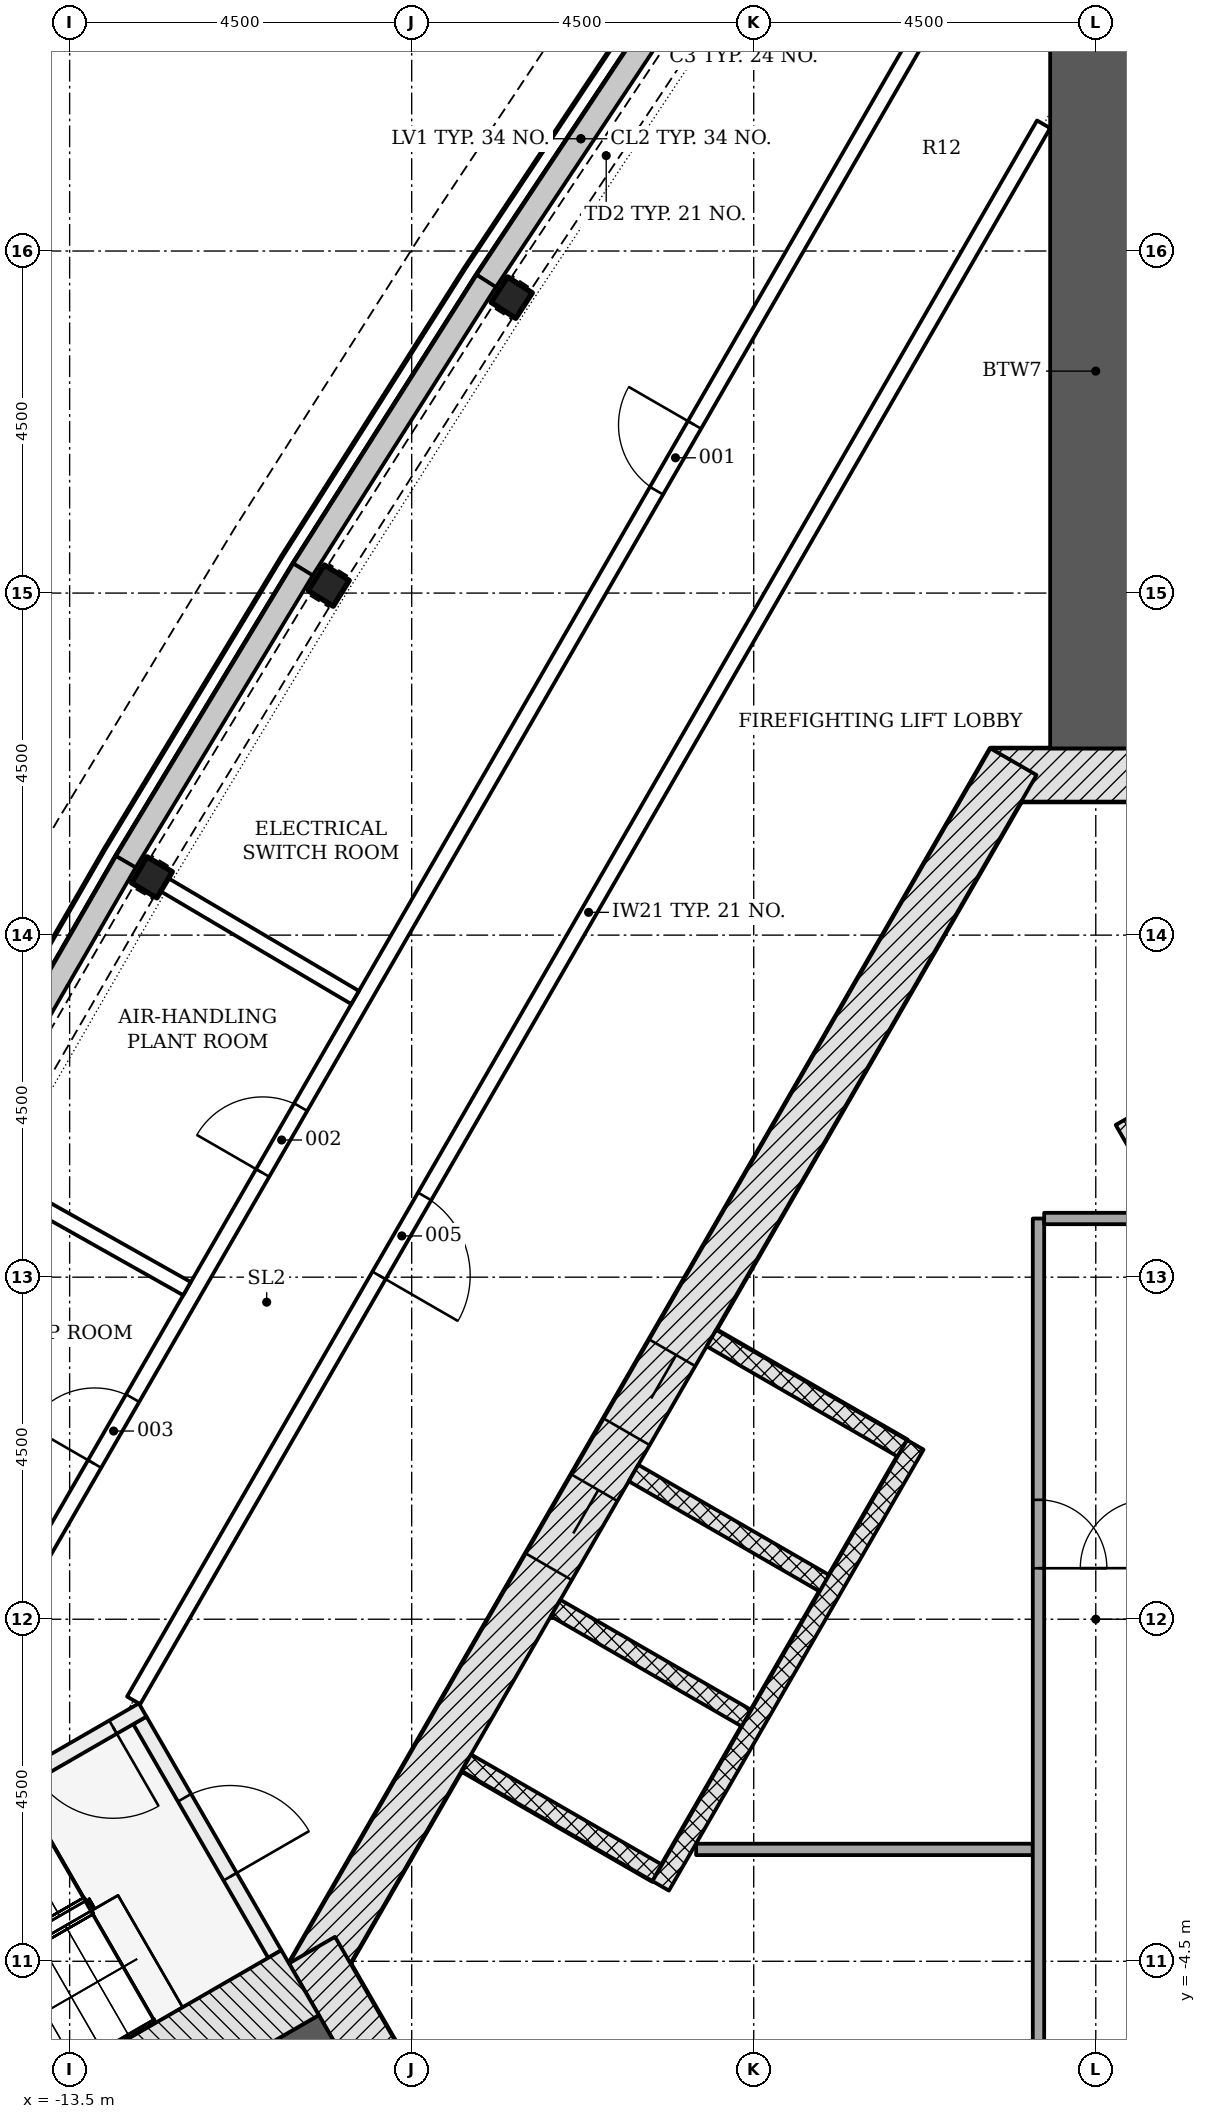
"""IFC4 building model, lengths in metres.
Left out: names, types, materials, properties, quantities, classifications, styles, units other than length and angle.
Written with IfcOpenShell. Run it as: python <this file> out.ifc"""

import sys

from ifc_helpers import new_model, si_unit, direction, frame, frame_2d, origin, origin_2d, place, context, subcontext, project, spatial, polyline, rectangle, i_section, outline, extrude, element, fill, save


model = new_model("IFC4")
c1 = context("Model", 3, precision=1e-05, world=origin(), true_north=direction((0.0, 1.0)))
c2 = subcontext(c1, "Body", "Model", "MODEL_VIEW")
j1 = project(units=[si_unit("LENGTHUNIT", "METRE"), si_unit("PLANEANGLEUNIT", "RADIAN")], contexts=[c1])
p1 = place(None, origin())
s1 = spatial("IfcSite", under=j1, at=p1, CompositionType="ELEMENT")
p2 = place(p1, origin())
s2 = spatial("IfcBuilding", under=s1, at=p2, CompositionType="ELEMENT")
p3 = place(p2, frame((0.0, 0.0, 168.9)))
s3 = spatial("IfcBuildingStorey", under=s2, at=p3, CompositionType="ELEMENT", Elevation=168.9)
p4 = place(p3, frame((1.386, 11.106, -0.3), z_axis=(0.0, 0.0, 1.0), x_axis=(-1.0, 0.0, 0.0)))
e1 = element("IfcWall", 1, at=p4, inside=s3, PredefinedType="SHEAR", context=c2, shape_type="SweptSolid", body=[
    extrude(rectangle(XDim=2.771, YDim=0.7, at=frame_2d((1.386, 0.0))), origin(), (0.0, 0.0, 1.0), 5.5),
])
p5 = place(p3, frame((-1.083, 11.281, -0.3), z_axis=(0.0, 0.0, 1.0), x_axis=(-0.500001446645, -0.866024568562, 0.0)))
e2 = element("IfcWall", 2, at=p5, inside=s3, PredefinedType="SHEAR", context=c2, shape_type="SweptSolid", body=[
    extrude(rectangle(XDim=18.458, YDim=0.7, at=frame_2d((9.229, 0.0))), origin(), (0.0, 0.0, 1.0), 5.5),
])
p6 = place(p5, frame((8.979, 0.0, 0.3)))
e3 = element("IfcOpeningElement", 3, at=p6, cuts=e2, PredefinedType="OPENING", context=c2, shape_type="SweptSolid", body=[
    extrude(rectangle(XDim=1.2, YDim=2.1, at=frame_2d((0.6, 1.05))), frame((0.0, 0.36, 0.0), z_axis=(0.0, -1.0, 0.0), x_axis=(1.0, 0.0, 0.0)), (0.0, 0.0, 1.0), 0.72),
])
p7 = place(p5, frame((11.029, 0.0, 0.3)))
e4 = element("IfcOpeningElement", 4, at=p7, cuts=e2, PredefinedType="OPENING", context=c2, shape_type="SweptSolid", body=[
    extrude(rectangle(XDim=1.2, YDim=2.1, at=frame_2d((0.6, 1.05))), frame((0.0, 0.36, 0.0), z_axis=(0.0, -1.0, 0.0), x_axis=(1.0, 0.0, 0.0)), (0.0, 0.0, 1.0), 0.72),
])
p8 = place(p3, frame((-10.311, -4.353, -0.3), z_axis=(0.0, 0.0, 1.0), x_axis=(0.500042739161, -0.866000726912, 0.0)))
e5 = element("IfcWall", 5, at=p8, inside=s3, PredefinedType="SHEAR", context=c2, shape_type="SweptSolid", body=[
    extrude(rectangle(XDim=2.771, YDim=0.7, at=frame_2d((1.386, 0.0))), origin(), (0.0, 0.0, 1.0), 5.5),
])
p9 = place(p3, frame((0.0, 11.456, -0.3), z_axis=(0.0, 0.0, 1.0), x_axis=(0.0, 1.0, 0.0)))
e6 = element("IfcWall", 6, at=p9, inside=s3, PredefinedType="SHEAR", context=c2, shape_type="SweptSolid", body=[
    extrude(rectangle(XDim=9.928, YDim=1.2, at=frame_2d((4.964, 0.0))), origin(), (0.0, 0.0, 1.0), 5.5),
])
p10 = place(p3, frame((-9.922, -5.728, -0.3), z_axis=(0.0, 0.0, 1.0), x_axis=(-0.866029553954, -0.499992811627, 0.0)))
e7 = element("IfcWall", 7, at=p10, inside=s3, PredefinedType="SHEAR", context=c2, shape_type="SweptSolid", body=[
    extrude(rectangle(XDim=9.927, YDim=1.2, at=frame_2d((4.964, 0.0))), origin(), (0.0, 0.0, 1.0), 5.5),
])
for number, where, z_axis, x_axis in (
    (8, (-7.684, 17.387, -0.3), (0.0, 0.0, 1.0), (-0.545, -0.838, 0.0)),
    (9, (-10.091, 13.599, -0.3), (0.0, 0.0, 1.0), (-0.527, -0.85, 0.0)),
    (10, (-12.417, 9.76, -0.3), (0.0, 0.0, 1.0), (-0.509, -0.861, 0.0)),
):
    element("IfcColumn", number, at=place(p3, frame(where, z_axis=z_axis, x_axis=x_axis)), inside=s3, PredefinedType="COLUMN", context=c2, shape_type="SweptSolid", body=[
        extrude(i_section(OverallWidth=0.399, OverallDepth=0.386, WebThickness=0.021, FlangeThickness=0.033, FilletRadius=0.015, at=origin_2d()), origin(), (0.0, 0.0, 1.0), 5.5),
    ])
p11 = place(p3, origin())
e11 = element("IfcWall", 11, at=p11, inside=s3, PredefinedType="NOTDEFINED", context=c2, shape_type="SweptSolid", body=[
    extrude(outline(polyline([(-5.652, 21.433), (-8.145, 17.687), (-7.896, 17.521), (-5.403, 21.267), (-5.652, 21.433)])), origin(), (0.0, 0.0, 1.0), 1.2),
])
p12 = place(p3, origin())
e12 = element("IfcWall", 12, at=p12, inside=s3, PredefinedType="NOTDEFINED", context=c2, shape_type="SweptSolid", body=[
    extrude(outline(polyline([(-8.145, 17.687), (-10.558, 13.889), (-10.305, 13.728), (-7.892, 17.526), (-8.145, 17.687)])), origin(), (0.0, 0.0, 1.0), 1.2),
])
p13 = place(p3, origin())
e13 = element("IfcWall", 13, at=p13, inside=s3, PredefinedType="NOTDEFINED", context=c2, shape_type="SweptSolid", body=[
    extrude(outline(polyline([(-10.558, 13.889), (-12.89, 10.04), (-12.634, 9.885), (-10.302, 13.733), (-10.558, 13.889)])), origin(), (0.0, 0.0, 1.0), 1.2),
])
p14 = place(p3, origin())
e14 = element("IfcWall", 14, at=p14, inside=s3, PredefinedType="NOTDEFINED", context=c2, shape_type="SweptSolid", body=[
    extrude(outline(polyline([(-12.89, 10.04), (-15.14, 6.143), (-14.88, 5.993), (-12.63, 9.89), (-12.89, 10.04)])), origin(), (0.0, 0.0, 1.0), 1.2),
])
p15 = place(p3, frame((5.87, -2.961, 0.0), z_axis=(0.0, 0.0, 1.0), x_axis=(-0.50000615651, 0.866021849293, 0.0)))
e15 = element("IfcWall", 15, at=p15, inside=s3, PredefinedType="PARTITIONING", context=c2, shape_type="SweptSolid", body=[
    extrude(rectangle(XDim=11.0, YDim=0.25, at=frame_2d((5.5, 0.0))), origin(), (0.0, 0.0, 1.0), 5.2),
])
for number, where, z_axis, x_axis in (
    (16, (-5.056, 3.699, -0.3), (0.0, 0.0, 1.0), (0.866, -0.5, 0.0)),
    (17, (-6.081, 1.923, -0.3), (0.0, 0.0, 1.0), (0.866, -0.5, 0.0)),
    (18, (-7.106, 0.148, -0.3), (0.0, 0.0, 1.0), (0.866, -0.5, 0.0)),
    (19, (-8.281, -1.887, -0.3), (0.0, 0.0, 1.0), (0.866, -0.5, 0.0)),
):
    element("IfcWall", number, at=place(p3, frame(where, z_axis=z_axis, x_axis=x_axis)), inside=s3, PredefinedType="PARTITIONING", context=c2, shape_type="SweptSolid", body=[
        extrude(rectangle(XDim=2.9, YDim=0.25, at=frame_2d((1.45, 0.0))), origin(), (0.0, 0.0, 1.0), 5.5),
    ])
p16 = place(p3, frame((-2.374, 2.294, 0.0), z_axis=(0.0, 0.0, 1.0), x_axis=(-0.500003174267, -0.866023571113, 0.0)))
e20 = element("IfcWall", 20, at=p16, inside=s3, PredefinedType="PARTITIONING", context=c2, shape_type="SweptSolid", body=[
    extrude(rectangle(XDim=6.7, YDim=0.25, at=frame_2d((3.35, 0.0))), origin(), (0.0, 0.0, 1.0), 5.2),
])
p17 = place(p3, frame((-5.258, -3.028, 0.0), z_axis=(0.0, 0.0, 1.0), x_axis=(1.0, 0.0, 0.0)))
e21 = element("IfcWall", 21, at=p17, inside=s3, PredefinedType="PARTITIONING", context=c2, shape_type="SweptSolid", body=[
    extrude(rectangle(XDim=4.429, YDim=0.15, at=frame_2d((2.215, 0.0))), origin(), (0.0, 0.0, 1.0), 5.2),
])
p18 = place(p3, frame((-0.754, 5.272, 0.0), z_axis=(0.0, 0.0, 1.0), x_axis=(0.0, -1.0, 0.0)))
e22 = element("IfcWall", 22, at=p18, inside=s3, PredefinedType="PARTITIONING", context=c2, shape_type="SweptSolid", body=[
    extrude(rectangle(XDim=11.5, YDim=0.15, at=frame_2d((5.75, 0.0))), origin(), (0.0, 0.0, 1.0), 5.2),
])
p19 = place(p18, frame((3.701, 0.0, 0.0)))
e23 = element("IfcOpeningElement", 23, at=p19, cuts=e22, PredefinedType="OPENING", context=c2, shape_type="SweptSolid", body=[
    extrude(rectangle(XDim=0.9, YDim=2.1, at=frame_2d((0.45, 1.05))), frame((0.0, 0.085, 0.0), z_axis=(0.0, -1.0, 0.0), x_axis=(1.0, 0.0, 0.0)), (0.0, 0.0, 1.0), 0.17),
])
p20 = place(p3, frame((-0.679, 5.272, 0.0), z_axis=(0.0, 0.0, 1.0), x_axis=(1.0, 0.0, 0.0)))
e24 = element("IfcWall", 24, at=p20, inside=s3, PredefinedType="PARTITIONING", context=c2, shape_type="SweptSolid", body=[
    extrude(rectangle(XDim=1.3, YDim=0.15, at=frame_2d((0.65, 0.0))), origin(), (0.0, 0.0, 1.0), 5.2),
])
p21 = place(p3, frame((-12.576, -1.331, -0.3), z_axis=(0.0, 0.0, 1.0), x_axis=(0.499970499736, -0.8660424351, 0.0)))
e25 = element("IfcWall", 25, at=p21, inside=s3, PredefinedType="SHEAR", context=c2, shape_type="SweptSolid", body=[
    extrude(rectangle(XDim=3.55, YDim=0.2, at=frame_2d((1.775, 0.0))), origin(), (0.0, 0.0, 1.0), 5.5),
])
p22 = place(p21, frame((1.175, 0.0, 0.3)))
e26 = element("IfcOpeningElement", 26, at=p22, cuts=e25, PredefinedType="OPENING", context=c2, shape_type="SweptSolid", body=[
    extrude(rectangle(XDim=1.2, YDim=2.1, at=frame_2d((0.6, 1.05))), frame((0.0, 0.11, 0.0), z_axis=(0.0, -1.0, 0.0), x_axis=(1.0, 0.0, 0.0)), (0.0, 0.0, 1.0), 0.22),
])
p23 = place(p3, frame((-12.539, -1.194, -0.3), z_axis=(0.0, 0.0, 1.0), x_axis=(-0.866045472092, -0.499965239061, 0.0)))
e27 = element("IfcWall", 27, at=p23, inside=s3, PredefinedType="SHEAR", context=c2, shape_type="SweptSolid", body=[
    extrude(rectangle(XDim=5.6, YDim=0.2, at=frame_2d((2.8, 0.0))), origin(), (0.0, 0.0, 1.0), 5.5),
])
p24 = place(p23, frame((0.45, 0.0, 0.3)))
e28 = element("IfcOpeningElement", 28, at=p24, cuts=e27, PredefinedType="OPENING", context=c2, shape_type="SweptSolid", body=[
    extrude(rectangle(XDim=1.2, YDim=2.1, at=frame_2d((0.6, 1.05))), frame((0.0, 0.11, 0.0), z_axis=(0.0, -1.0, 0.0), x_axis=(1.0, 0.0, 0.0)), (0.0, 0.0, 1.0), 0.22),
])
p25 = place(p3, frame((-10.468, -4.782, -0.3), z_axis=(0.0, 0.0, 1.0), x_axis=(-0.866018442252, -0.500012057535, 0.0)))
e29 = element("IfcWall", 29, at=p25, inside=s3, PredefinedType="SHEAR", context=c2, shape_type="SweptSolid", body=[
    extrude(rectangle(XDim=7.2, YDim=0.986, at=frame_2d((3.6, 0.0))), origin(), (0.0, 0.0, 1.0), 5.5),
])
p26 = place(p3, frame((-0.687, 19.667, 0.0), z_axis=(0.0, 0.0, 1.0), x_axis=(-0.500000491645, -0.866025119933, 0.0)))
e30 = element("IfcWall", 30, at=p26, inside=s3, PredefinedType="PARTITIONING", context=c2, shape_type="SweptSolid", body=[
    extrude(rectangle(XDim=23.943, YDim=0.2, at=frame_2d((11.971, 0.0))), origin(), (0.0, 0.0, 1.0), 4.647),
])
p27 = place(p26, frame((16.287, 0.0, 0.0)))
e31 = element("IfcOpeningElement", 31, at=p27, cuts=e30, PredefinedType="OPENING", context=c2, shape_type="SweptSolid", body=[
    extrude(rectangle(XDim=1.2, YDim=2.1, at=frame_2d((0.6, 1.05))), frame((0.0, 0.11, 0.0), z_axis=(0.0, -1.0, 0.0), x_axis=(1.0, 0.0, 0.0)), (0.0, 0.0, 1.0), 0.22),
])
p28 = place(p3, frame((-16.104, -3.037, 0.0), z_axis=(0.0, 0.0, 1.0), x_axis=(0.500000282061, 0.866025240936, 0.0)))
e32 = element("IfcWall", 32, at=p28, inside=s3, PredefinedType="PARTITIONING", context=c2, shape_type="SweptSolid", body=[
    extrude(rectangle(XDim=29.235, YDim=0.2, at=frame_2d((14.617, 0.0))), origin(), (0.0, 0.0, 1.0), 4.647),
])
p29 = place(p28, frame((20.65, 0.0, 0.0)))
e33 = element("IfcOpeningElement", 33, at=p29, cuts=e32, PredefinedType="OPENING", context=c2, shape_type="SweptSolid", body=[
    extrude(rectangle(XDim=1.0, YDim=2.1, at=frame_2d((0.5, 1.05))), frame((0.0, 0.11, 0.0), z_axis=(0.0, -1.0, 0.0), x_axis=(1.0, 0.0, 0.0)), (0.0, 0.0, 1.0), 0.22),
])
p30 = place(p28, frame((10.287, 0.0, 0.0)))
e34 = element("IfcOpeningElement", 34, at=p30, cuts=e32, PredefinedType="OPENING", context=c2, shape_type="SweptSolid", body=[
    extrude(rectangle(XDim=1.0, YDim=2.1, at=frame_2d((0.5, 1.05))), frame((0.0, 0.11, 0.0), z_axis=(0.0, -1.0, 0.0), x_axis=(1.0, 0.0, 0.0)), (0.0, 0.0, 1.0), 0.22),
])
p31 = place(p28, frame((5.865, 0.0, 0.0)))
e35 = element("IfcOpeningElement", 35, at=p31, cuts=e32, PredefinedType="OPENING", context=c2, shape_type="SweptSolid", body=[
    extrude(rectangle(XDim=1.0, YDim=2.1, at=frame_2d((0.5, 1.05))), frame((0.0, 0.11, 0.0), z_axis=(0.0, -1.0, 0.0), x_axis=(1.0, 0.0, 0.0)), (0.0, 0.0, 1.0), 0.22),
])
p32 = place(p28, frame((1.859, 0.0, 0.0)))
e36 = element("IfcOpeningElement", 36, at=p32, cuts=e32, PredefinedType="OPENING", context=c2, shape_type="SweptSolid", body=[
    extrude(rectangle(XDim=1.0, YDim=2.1, at=frame_2d((0.5, 1.05))), frame((0.0, 0.11, 0.0), z_axis=(0.0, -1.0, 0.0), x_axis=(1.0, 0.0, 0.0)), (0.0, 0.0, 1.0), 0.22),
])
p33 = place(p3, frame((-12.288, 9.684, 0.0), z_axis=(0.0, 0.0, 1.0), x_axis=(0.860699381133, -0.509113519088, 0.0)))
e37 = element("IfcWall", 37, at=p33, inside=s3, PredefinedType="PARTITIONING", context=c2, shape_type="SweptSolid", body=[
    extrude(rectangle(XDim=2.954, YDim=0.2, at=frame_2d((1.477, 0.0))), origin(), (0.0, 0.0, 1.0), 4.647),
])
p34 = place(p3, frame((-14.53, 5.8, 0.0), z_axis=(0.0, 0.0, 1.0), x_axis=(0.871273012139, -0.490798673916, 0.0)))
e38 = element("IfcWall", 38, at=p34, inside=s3, PredefinedType="PARTITIONING", context=c2, shape_type="SweptSolid", body=[
    extrude(rectangle(XDim=2.954, YDim=0.2, at=frame_2d((1.477, 0.0))), origin(), (0.0, 0.0, 1.0), 4.647),
])
p35 = place(p6, origin())
e39 = element("IfcDoor", 39, at=p35, inside=s3, OperationType="DOUBLE_DOOR_SLIDING", PredefinedType="DOOR", context=c2, shape_type="SweptSolid", body=[
    extrude(rectangle(XDim=1.2, YDim=2.1, at=frame_2d((0.6, 1.05))), frame((0.0, 0.025, 0.0), z_axis=(0.0, -1.0, 0.0), x_axis=(1.0, 0.0, 0.0)), (0.0, 0.0, 1.0), 0.05),
])
fill(e3, e39)
p36 = place(p7, origin())
e40 = element("IfcDoor", 40, at=p36, inside=s3, OperationType="DOUBLE_DOOR_SLIDING", PredefinedType="DOOR", context=c2, shape_type="SweptSolid", body=[
    extrude(rectangle(XDim=1.2, YDim=2.1, at=frame_2d((0.6, 1.05))), frame((0.0, 0.025, 0.0), z_axis=(0.0, -1.0, 0.0), x_axis=(1.0, 0.0, 0.0)), (0.0, 0.0, 1.0), 0.05),
])
fill(e4, e40)
p37 = place(p19, origin())
e41 = element("IfcDoor", 41, at=p37, inside=s3, OperationType="SINGLE_SWING_RIGHT", PredefinedType="DOOR", context=c2, shape_type="SweptSolid", body=[
    extrude(rectangle(XDim=0.9, YDim=2.1, at=frame_2d((0.45, 1.05))), frame((0.0, 0.025, 0.0), z_axis=(0.0, -1.0, 0.0), x_axis=(1.0, 0.0, 0.0)), (0.0, 0.0, 1.0), 0.05),
])
fill(e23, e41)
p38 = place(p22, origin())
e42 = element("IfcDoor", 42, at=p38, inside=s3, OperationType="SINGLE_SWING_RIGHT", PredefinedType="DOOR", context=c2, shape_type="SweptSolid", body=[
    extrude(rectangle(XDim=1.2, YDim=2.1, at=frame_2d((0.6, 1.05))), frame((0.0, 0.025, 0.0), z_axis=(0.0, -1.0, 0.0), x_axis=(1.0, 0.0, 0.0)), (0.0, 0.0, 1.0), 0.05),
])
fill(e26, e42)
p39 = place(p24, origin())
e43 = element("IfcDoor", 43, at=p39, inside=s3, OperationType="SINGLE_SWING_LEFT", PredefinedType="DOOR", context=c2, shape_type="SweptSolid", body=[
    extrude(rectangle(XDim=1.2, YDim=2.1, at=frame_2d((0.6, 1.05))), frame((0.0, 0.025, 0.0), z_axis=(0.0, -1.0, 0.0), x_axis=(1.0, 0.0, 0.0)), (0.0, 0.0, 1.0), 0.05),
])
fill(e28, e43)
p40 = place(p29, origin())
e44 = element("IfcDoor", 44, at=p40, inside=s3, OperationType="SINGLE_SWING_RIGHT", PredefinedType="DOOR", context=c2, shape_type="SweptSolid", body=[
    extrude(rectangle(XDim=1.0, YDim=2.1, at=frame_2d((0.5, 1.05))), frame((0.0, 0.025, 0.0), z_axis=(0.0, -1.0, 0.0), x_axis=(1.0, 0.0, 0.0)), (0.0, 0.0, 1.0), 0.05),
])
fill(e33, e44)
p41 = place(p30, origin())
e45 = element("IfcDoor", 45, at=p41, inside=s3, OperationType="SINGLE_SWING_LEFT", PredefinedType="DOOR", context=c2, shape_type="SweptSolid", body=[
    extrude(rectangle(XDim=1.0, YDim=2.1, at=frame_2d((0.5, 1.05))), frame((0.0, 0.025, 0.0), z_axis=(0.0, -1.0, 0.0), x_axis=(1.0, 0.0, 0.0)), (0.0, 0.0, 1.0), 0.05),
])
fill(e34, e45)
p42 = place(p31, origin())
e46 = element("IfcDoor", 46, at=p42, inside=s3, OperationType="SINGLE_SWING_LEFT", PredefinedType="DOOR", context=c2, shape_type="SweptSolid", body=[
    extrude(rectangle(XDim=1.0, YDim=2.1, at=frame_2d((0.5, 1.05))), frame((0.0, 0.025, 0.0), z_axis=(0.0, -1.0, 0.0), x_axis=(1.0, 0.0, 0.0)), (0.0, 0.0, 1.0), 0.05),
])
fill(e35, e46)
p43 = place(p27, origin())
e47 = element("IfcDoor", 47, at=p43, inside=s3, OperationType="SINGLE_SWING_RIGHT", PredefinedType="DOOR", context=c2, shape_type="SweptSolid", body=[
    extrude(rectangle(XDim=1.2, YDim=2.1, at=frame_2d((0.6, 1.05))), frame((0.0, 0.025, 0.0), z_axis=(0.0, -1.0, 0.0), x_axis=(1.0, 0.0, 0.0)), (0.0, 0.0, 1.0), 0.05),
])
fill(e31, e47)
save(model, sys.argv[1])
